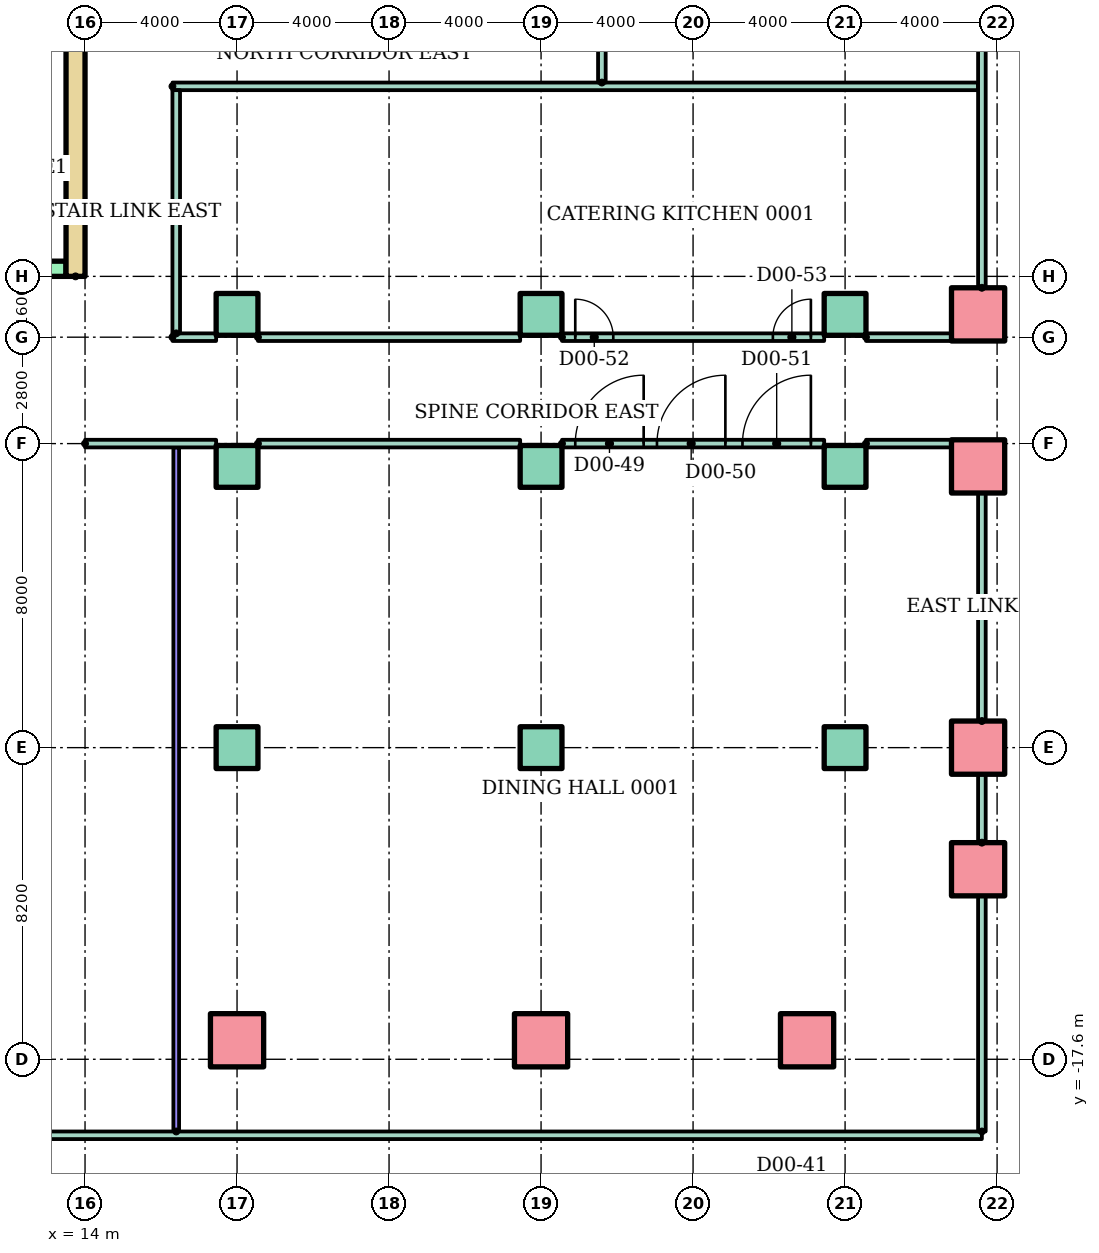
"""IFC4 building model, lengths in metres.
Left out: names, types, materials, properties, quantities, classifications, styles, units other than length and angle.
Written with IfcOpenShell. Run it as: python <this file> out.ifc"""

import sys

from ifc_helpers import new_model, si_unit, direction, frame, frame_2d, origin, origin_2d, place, context, subcontext, project, spatial, rectangle, hollow_rectangle, extrude, element, fill, save


model = new_model("IFC4")
c1 = context("Model", 3, precision=1e-05, world=origin(), true_north=direction((0.0, 1.0)))
c2 = subcontext(c1, "Body", "Model", "MODEL_VIEW")
j1 = project(units=[si_unit("LENGTHUNIT", "METRE"), si_unit("PLANEANGLEUNIT", "RADIAN")], contexts=[c1])
p1 = place(None, origin())
s1 = spatial("IfcSite", under=j1, at=p1, CompositionType="ELEMENT")
p2 = place(p1, origin())
s2 = spatial("IfcBuilding", under=s1, at=p2, CompositionType="ELEMENT")
p3 = place(p2, origin())
s3 = spatial("IfcBuildingStorey", under=s2, at=p3, CompositionType="ELEMENT", Elevation=0.0)
for number, where in (
    (1, (18.0, -17.1, 0.0)),
    (2, (26.0, -17.1, 0.0)),
    (3, (33.0, -17.1, 0.0)),
    (4, (37.5, -12.6, 0.0)),
):
    element("IfcColumn", number, at=place(p3, frame(where)), inside=s3, PredefinedType="COLUMN", context=c2, shape_type="SweptSolid", body=[
        extrude(hollow_rectangle(XDim=1.4, YDim=1.4, WallThickness=0.08, at=origin_2d()), origin(), (0.0, 0.0, 1.0), 6.0),
    ])
for number, where in (
    (5, (18.0, -9.4, 0.0)),
    (6, (26.0, -9.4, 0.0)),
    (7, (34.0, -9.4, 0.0)),
):
    element("IfcColumn", number, at=place(p3, frame(where)), inside=s3, PredefinedType="COLUMN", context=c2, shape_type="SweptSolid", body=[
        extrude(rectangle(XDim=1.1, YDim=1.1, at=origin_2d()), origin(), (0.0, 0.0, 1.0), 6.0),
    ])
p4 = place(p3, frame((37.5, -9.4, 0.0)))
e8 = element("IfcColumn", 8, at=p4, inside=s3, PredefinedType="COLUMN", context=c2, shape_type="SweptSolid", body=[
    extrude(hollow_rectangle(XDim=1.4, YDim=1.4, WallThickness=0.08, at=origin_2d()), origin(), (0.0, 0.0, 1.0), 6.0),
])
for number, where in (
    (9, (18.0, -2.0, 0.0)),
    (10, (26.0, -2.0, 0.0)),
    (11, (34.0, -2.0, 0.0)),
):
    element("IfcColumn", number, at=place(p3, frame(where)), inside=s3, PredefinedType="COLUMN", context=c2, shape_type="SweptSolid", body=[
        extrude(rectangle(XDim=1.1, YDim=1.1, at=origin_2d()), origin(), (0.0, 0.0, 1.0), 6.0),
    ])
p5 = place(p3, frame((37.5, -2.0, 0.0)))
e12 = element("IfcColumn", 12, at=p5, inside=s3, PredefinedType="COLUMN", context=c2, shape_type="SweptSolid", body=[
    extrude(hollow_rectangle(XDim=1.4, YDim=1.4, WallThickness=0.08, at=origin_2d()), origin(), (0.0, 0.0, 1.0), 6.0),
])
for number, where in (
    (13, (18.0, 2.0, 0.0)),
    (14, (26.0, 2.0, 0.0)),
    (15, (34.0, 2.0, 0.0)),
):
    element("IfcColumn", number, at=place(p3, frame(where)), inside=s3, PredefinedType="COLUMN", context=c2, shape_type="SweptSolid", body=[
        extrude(rectangle(XDim=1.1, YDim=1.1, at=origin_2d()), origin(), (0.0, 0.0, 1.0), 6.0),
    ])
p6 = place(p3, frame((37.5, 2.0, 0.0)))
e16 = element("IfcColumn", 16, at=p6, inside=s3, PredefinedType="COLUMN", context=c2, shape_type="SweptSolid", body=[
    extrude(hollow_rectangle(XDim=1.4, YDim=1.4, WallThickness=0.08, at=origin_2d()), origin(), (0.0, 0.0, 1.0), 6.0),
])
p7 = place(p3, frame((13.75, 3.0, 0.0), z_axis=(0.0, 0.0, 1.0), x_axis=(0.0, 1.0, 0.0)))
e17 = element("IfcWall", 17, at=p7, inside=s3, PredefinedType="SHEAR", context=c2, shape_type="SweptSolid", body=[
    extrude(rectangle(XDim=17.0, YDim=0.5, at=frame_2d((8.5, 0.0))), origin(), (0.0, 0.0, 1.0), 5.7),
])
p8 = place(p3, frame((-13.5, 3.2, 0.0)))
e18 = element("IfcWall", 18, at=p8, inside=s3, PredefinedType="SHEAR", context=c2, shape_type="SweptSolid", body=[
    extrude(rectangle(XDim=27.0, YDim=0.4, at=frame_2d((13.5, 0.0))), origin(), (0.0, 0.0, 1.0), 5.7),
])
p9 = place(p8, frame((0.772, 0.0, 0.0)))
e19 = element("IfcOpeningElement", 19, at=p9, cuts=e18, PredefinedType="OPENING", context=c2, shape_type="SweptSolid", body=[
    extrude(rectangle(XDim=1.1, YDim=2.1, at=frame_2d((0.55, 1.05))), frame((0.0, 0.21, 0.0), z_axis=(0.0, -1.0, 0.0), x_axis=(1.0, 0.0, 0.0)), (0.0, 0.0, 1.0), 0.42),
])
p10 = place(p8, frame((3.817, 0.0, 0.0)))
e20 = element("IfcOpeningElement", 20, at=p10, cuts=e18, PredefinedType="OPENING", context=c2, shape_type="SweptSolid", body=[
    extrude(rectangle(XDim=1.1, YDim=2.1, at=frame_2d((0.55, 1.05))), frame((0.0, 0.21, 0.0), z_axis=(0.0, -1.0, 0.0), x_axis=(1.0, 0.0, 0.0)), (0.0, 0.0, 1.0), 0.42),
])
p11 = place(p8, frame((6.861, 0.0, 0.0)))
e21 = element("IfcOpeningElement", 21, at=p11, cuts=e18, PredefinedType="OPENING", context=c2, shape_type="SweptSolid", body=[
    extrude(rectangle(XDim=1.1, YDim=2.1, at=frame_2d((0.55, 1.05))), frame((0.0, 0.21, 0.0), z_axis=(0.0, -1.0, 0.0), x_axis=(1.0, 0.0, 0.0)), (0.0, 0.0, 1.0), 0.42),
])
p12 = place(p8, frame((9.906, 0.0, 0.0)))
e22 = element("IfcOpeningElement", 22, at=p12, cuts=e18, PredefinedType="OPENING", context=c2, shape_type="SweptSolid", body=[
    extrude(rectangle(XDim=1.1, YDim=2.1, at=frame_2d((0.55, 1.05))), frame((0.0, 0.21, 0.0), z_axis=(0.0, -1.0, 0.0), x_axis=(1.0, 0.0, 0.0)), (0.0, 0.0, 1.0), 0.42),
])
p13 = place(p8, frame((15.994, 0.0, 0.0)))
e23 = element("IfcOpeningElement", 23, at=p13, cuts=e18, PredefinedType="OPENING", context=c2, shape_type="SweptSolid", body=[
    extrude(rectangle(XDim=1.1, YDim=2.1, at=frame_2d((0.55, 1.05))), frame((0.0, 0.21, 0.0), z_axis=(0.0, -1.0, 0.0), x_axis=(1.0, 0.0, 0.0)), (0.0, 0.0, 1.0), 0.42),
])
p14 = place(p8, frame((19.039, 0.0, 0.0)))
e24 = element("IfcOpeningElement", 24, at=p14, cuts=e18, PredefinedType="OPENING", context=c2, shape_type="SweptSolid", body=[
    extrude(rectangle(XDim=1.1, YDim=2.1, at=frame_2d((0.55, 1.05))), frame((0.0, 0.21, 0.0), z_axis=(0.0, -1.0, 0.0), x_axis=(1.0, 0.0, 0.0)), (0.0, 0.0, 1.0), 0.42),
])
p15 = place(p8, frame((12.6, 0.0, 0.0)))
e25 = element("IfcOpeningElement", 25, at=p15, cuts=e18, PredefinedType="OPENING", context=c2, shape_type="SweptSolid", body=[
    extrude(rectangle(XDim=1.8, YDim=2.1, at=frame_2d((0.9, 1.05))), frame((0.0, 0.21, 0.0), z_axis=(0.0, -1.0, 0.0), x_axis=(1.0, 0.0, 0.0)), (0.0, 0.0, 1.0), 0.42),
])
p16 = place(p3, frame((-37.6, -19.6, 0.0)))
e26 = element("IfcWall", 26, at=p16, inside=s3, PredefinedType="PARTITIONING", context=c2, shape_type="SweptSolid", body=[
    extrude(rectangle(XDim=75.2, YDim=0.2, at=frame_2d((37.6, 0.0))), origin(), (0.0, 0.0, 1.0), 5.7),
])
p17 = place(p16, frame((26.204, 0.0, 0.0)))
e27 = element("IfcOpeningElement", 27, at=p17, cuts=e26, PredefinedType="OPENING", context=c2, shape_type="SweptSolid", body=[
    extrude(rectangle(XDim=1.8, YDim=2.1, at=frame_2d((0.9, 1.05))), frame((0.0, 0.11, 0.0), z_axis=(0.0, -1.0, 0.0), x_axis=(1.0, 0.0, 0.0)), (0.0, 0.0, 1.0), 0.22),
])
p18 = place(p16, frame((36.7, 0.0, 0.0)))
e28 = element("IfcOpeningElement", 28, at=p18, cuts=e26, PredefinedType="OPENING", context=c2, shape_type="SweptSolid", body=[
    extrude(rectangle(XDim=1.8, YDim=2.1, at=frame_2d((0.9, 1.05))), frame((0.0, 0.11, 0.0), z_axis=(0.0, -1.0, 0.0), x_axis=(1.0, 0.0, 0.0)), (0.0, 0.0, 1.0), 0.22),
])
p19 = place(p16, frame((47.196, 0.0, 0.0)))
e29 = element("IfcOpeningElement", 29, at=p19, cuts=e26, PredefinedType="OPENING", context=c2, shape_type="SweptSolid", body=[
    extrude(rectangle(XDim=1.8, YDim=2.1, at=frame_2d((0.9, 1.05))), frame((0.0, 0.11, 0.0), z_axis=(0.0, -1.0, 0.0), x_axis=(1.0, 0.0, 0.0)), (0.0, 0.0, 1.0), 0.22),
])
p20 = place(p3, frame((14.0, -1.4, 0.0)))
e30 = element("IfcWall", 30, at=p20, inside=s3, PredefinedType="PARTITIONING", context=c2, shape_type="SweptSolid", body=[
    extrude(rectangle(XDim=3.45, YDim=0.2, at=frame_2d((1.725, 0.0))), origin(), (0.0, 0.0, 1.0), 5.7),
])
p21 = place(p3, frame((18.55, -1.4, 0.0)))
e31 = element("IfcWall", 31, at=p21, inside=s3, PredefinedType="PARTITIONING", context=c2, shape_type="SweptSolid", body=[
    extrude(rectangle(XDim=6.9, YDim=0.2, at=frame_2d((3.45, 0.0))), origin(), (0.0, 0.0, 1.0), 5.7),
])
p22 = place(p3, frame((26.55, -1.4, 0.0)))
e32 = element("IfcWall", 32, at=p22, inside=s3, PredefinedType="PARTITIONING", context=c2, shape_type="SweptSolid", body=[
    extrude(rectangle(XDim=6.9, YDim=0.2, at=frame_2d((3.45, 0.0))), origin(), (0.0, 0.0, 1.0), 5.7),
])
p23 = place(p22, frame((0.35, 0.0, 0.0)))
e33 = element("IfcOpeningElement", 33, at=p23, cuts=e32, PredefinedType="OPENING", context=c2, shape_type="SweptSolid", body=[
    extrude(rectangle(XDim=1.8, YDim=2.1, at=frame_2d((0.9, 1.05))), frame((0.0, 0.11, 0.0), z_axis=(0.0, -1.0, 0.0), x_axis=(1.0, 0.0, 0.0)), (0.0, 0.0, 1.0), 0.22),
])
p24 = place(p22, frame((2.5, 0.0, 0.0)))
e34 = element("IfcOpeningElement", 34, at=p24, cuts=e32, PredefinedType="OPENING", context=c2, shape_type="SweptSolid", body=[
    extrude(rectangle(XDim=1.8, YDim=2.1, at=frame_2d((0.9, 1.05))), frame((0.0, 0.11, 0.0), z_axis=(0.0, -1.0, 0.0), x_axis=(1.0, 0.0, 0.0)), (0.0, 0.0, 1.0), 0.22),
])
p25 = place(p22, frame((4.75, 0.0, 0.0)))
e35 = element("IfcOpeningElement", 35, at=p25, cuts=e32, PredefinedType="OPENING", context=c2, shape_type="SweptSolid", body=[
    extrude(rectangle(XDim=1.8, YDim=2.1, at=frame_2d((0.9, 1.05))), frame((0.0, 0.11, 0.0), z_axis=(0.0, -1.0, 0.0), x_axis=(1.0, 0.0, 0.0)), (0.0, 0.0, 1.0), 0.22),
])
p26 = place(p3, frame((34.55, -1.4, 0.0)))
e36 = element("IfcWall", 36, at=p26, inside=s3, PredefinedType="PARTITIONING", context=c2, shape_type="SweptSolid", body=[
    extrude(rectangle(XDim=2.25, YDim=0.2, at=frame_2d((1.125, 0.0))), origin(), (0.0, 0.0, 1.0), 5.7),
])
p27 = place(p3, frame((16.3, 1.4, 0.0)))
e37 = element("IfcWall", 37, at=p27, inside=s3, PredefinedType="PARTITIONING", context=c2, shape_type="SweptSolid", body=[
    extrude(rectangle(XDim=1.15, YDim=0.2, at=frame_2d((0.575, 0.0))), origin(), (0.0, 0.0, 1.0), 5.7),
])
p28 = place(p3, frame((18.55, 1.4, 0.0)))
e38 = element("IfcWall", 38, at=p28, inside=s3, PredefinedType="PARTITIONING", context=c2, shape_type="SweptSolid", body=[
    extrude(rectangle(XDim=6.9, YDim=0.2, at=frame_2d((3.45, 0.0))), origin(), (0.0, 0.0, 1.0), 5.7),
])
p29 = place(p3, frame((26.55, 1.4, 0.0)))
e39 = element("IfcWall", 39, at=p29, inside=s3, PredefinedType="PARTITIONING", context=c2, shape_type="SweptSolid", body=[
    extrude(rectangle(XDim=6.9, YDim=0.2, at=frame_2d((3.45, 0.0))), origin(), (0.0, 0.0, 1.0), 5.7),
])
p30 = place(p29, frame((0.35, 0.0, 0.0)))
e40 = element("IfcOpeningElement", 40, at=p30, cuts=e39, PredefinedType="OPENING", context=c2, shape_type="SweptSolid", body=[
    extrude(rectangle(XDim=1.0, YDim=2.1, at=frame_2d((0.5, 1.05))), frame((0.0, 0.11, 0.0), z_axis=(0.0, -1.0, 0.0), x_axis=(1.0, 0.0, 0.0)), (0.0, 0.0, 1.0), 0.22),
])
p31 = place(p29, frame((5.55, 0.0, 0.0)))
e41 = element("IfcOpeningElement", 41, at=p31, cuts=e39, PredefinedType="OPENING", context=c2, shape_type="SweptSolid", body=[
    extrude(rectangle(XDim=1.0, YDim=2.1, at=frame_2d((0.5, 1.05))), frame((0.0, 0.11, 0.0), z_axis=(0.0, -1.0, 0.0), x_axis=(1.0, 0.0, 0.0)), (0.0, 0.0, 1.0), 0.22),
])
p32 = place(p3, frame((34.55, 1.4, 0.0)))
e42 = element("IfcWall", 42, at=p32, inside=s3, PredefinedType="PARTITIONING", context=c2, shape_type="SweptSolid", body=[
    extrude(rectangle(XDim=2.25, YDim=0.2, at=frame_2d((1.125, 0.0))), origin(), (0.0, 0.0, 1.0), 5.7),
])
p33 = place(p3, frame((16.3, 8.0, 0.0)))
e43 = element("IfcWall", 43, at=p33, inside=s3, PredefinedType="PARTITIONING", context=c2, shape_type="SweptSolid", body=[
    extrude(rectangle(XDim=21.2, YDim=0.2, at=frame_2d((10.6, 0.0))), origin(), (0.0, 0.0, 1.0), 5.7),
])
p34 = place(p3, frame((16.4, 1.5, 0.0), z_axis=(0.0, 0.0, 1.0), x_axis=(0.0, 1.0, 0.0)))
e44 = element("IfcWall", 44, at=p34, inside=s3, PredefinedType="PARTITIONING", context=c2, shape_type="SweptSolid", body=[
    extrude(rectangle(XDim=6.4, YDim=0.2, at=frame_2d((3.2, 0.0))), origin(), (0.0, 0.0, 1.0), 5.7),
])
p35 = place(p3, frame((16.4, -19.5, 0.0), z_axis=(0.0, 0.0, 1.0), x_axis=(0.0, 1.0, 0.0)))
e45 = element("IfcWall", 45, at=p35, inside=s3, PredefinedType="PARTITIONING", context=c2, shape_type="SweptSolid", body=[
    extrude(rectangle(XDim=18.0, YDim=0.15, at=frame_2d((9.0, 0.0))), origin(), (0.0, 0.0, 1.0), 5.7),
])
p36 = place(p3, frame((27.6, 8.1, 0.0), z_axis=(0.0, 0.0, 1.0), x_axis=(0.0, 1.0, 0.0)))
e46 = element("IfcWall", 46, at=p36, inside=s3, PredefinedType="PARTITIONING", context=c2, shape_type="SweptSolid", body=[
    extrude(rectangle(XDim=11.5, YDim=0.2, at=frame_2d((5.75, 0.0))), origin(), (0.0, 0.0, 1.0), 5.7),
])
p37 = place(p36, frame((0.9, 0.0, 0.0)))
e47 = element("IfcOpeningElement", 47, at=p37, cuts=e46, PredefinedType="OPENING", context=c2, shape_type="SweptSolid", body=[
    extrude(rectangle(XDim=1.0, YDim=2.1, at=frame_2d((0.5, 1.05))), frame((0.0, 0.11, 0.0), z_axis=(0.0, -1.0, 0.0), x_axis=(1.0, 0.0, 0.0)), (0.0, 0.0, 1.0), 0.22),
])
p38 = place(p3, frame((37.6, -19.5, 0.0), z_axis=(0.0, 0.0, 1.0), x_axis=(0.0, 1.0, 0.0)))
e48 = element("IfcWall", 48, at=p38, inside=s3, PredefinedType="PARTITIONING", context=c2, shape_type="SweptSolid", body=[
    extrude(rectangle(XDim=6.2, YDim=0.2, at=frame_2d((3.1, 0.0))), origin(), (0.0, 0.0, 1.0), 5.7),
])
p39 = place(p3, frame((37.6, -11.9, 0.0), z_axis=(0.0, 0.0, 1.0), x_axis=(0.0, 1.0, 0.0)))
e49 = element("IfcWall", 49, at=p39, inside=s3, PredefinedType="PARTITIONING", context=c2, shape_type="SweptSolid", body=[
    extrude(rectangle(XDim=1.8, YDim=0.2, at=frame_2d((0.9, 0.0))), origin(), (0.0, 0.0, 1.0), 5.7),
])
p40 = place(p3, frame((37.6, -8.7, 0.0), z_axis=(0.0, 0.0, 1.0), x_axis=(0.0, 1.0, 0.0)))
e50 = element("IfcWall", 50, at=p40, inside=s3, PredefinedType="PARTITIONING", context=c2, shape_type="SweptSolid", body=[
    extrude(rectangle(XDim=6.0, YDim=0.2, at=frame_2d((3.0, 0.0))), origin(), (0.0, 0.0, 1.0), 5.7),
])
p41 = place(p3, frame((37.6, 2.7, 0.0), z_axis=(0.0, 0.0, 1.0), x_axis=(0.0, 1.0, 0.0)))
e51 = element("IfcWall", 51, at=p41, inside=s3, PredefinedType="PARTITIONING", context=c2, shape_type="SweptSolid", body=[
    extrude(rectangle(XDim=7.6, YDim=0.2, at=frame_2d((3.8, 0.0))), origin(), (0.0, 0.0, 1.0), 5.7),
])
p42 = place(p41, frame((6.25, 0.0, 0.0)))
e52 = element("IfcOpeningElement", 52, at=p42, cuts=e51, PredefinedType="OPENING", context=c2, shape_type="SweptSolid", body=[
    extrude(rectangle(XDim=1.0, YDim=2.1, at=frame_2d((0.5, 1.05))), frame((0.0, 0.11, 0.0), z_axis=(0.0, -1.0, 0.0), x_axis=(1.0, 0.0, 0.0)), (0.0, 0.0, 1.0), 0.22),
])
p43 = place(p23, origin())
e53 = element("IfcDoor", 53, at=p43, inside=s3, OperationType="DOUBLE_DOOR_SINGLE_SWING", PredefinedType="DOOR", context=c2, shape_type="SweptSolid", body=[
    extrude(rectangle(XDim=1.8, YDim=2.1, at=frame_2d((0.9, 1.05))), frame((0.0, 0.025, 0.0), z_axis=(0.0, -1.0, 0.0), x_axis=(1.0, 0.0, 0.0)), (0.0, 0.0, 1.0), 0.05),
])
fill(e33, e53)
p44 = place(p24, origin())
e54 = element("IfcDoor", 54, at=p44, inside=s3, OperationType="DOUBLE_DOOR_SINGLE_SWING", PredefinedType="DOOR", context=c2, shape_type="SweptSolid", body=[
    extrude(rectangle(XDim=1.8, YDim=2.1, at=frame_2d((0.9, 1.05))), frame((0.0, 0.025, 0.0), z_axis=(0.0, -1.0, 0.0), x_axis=(1.0, 0.0, 0.0)), (0.0, 0.0, 1.0), 0.05),
])
fill(e34, e54)
p45 = place(p25, origin())
e55 = element("IfcDoor", 55, at=p45, inside=s3, OperationType="DOUBLE_DOOR_SINGLE_SWING", PredefinedType="DOOR", context=c2, shape_type="SweptSolid", body=[
    extrude(rectangle(XDim=1.8, YDim=2.1, at=frame_2d((0.9, 1.05))), frame((0.0, 0.025, 0.0), z_axis=(0.0, -1.0, 0.0), x_axis=(1.0, 0.0, 0.0)), (0.0, 0.0, 1.0), 0.05),
])
fill(e35, e55)
p46 = place(p30, origin())
e56 = element("IfcDoor", 56, at=p46, inside=s3, OperationType="SINGLE_SWING_LEFT", PredefinedType="DOOR", context=c2, shape_type="SweptSolid", body=[
    extrude(rectangle(XDim=1.0, YDim=2.1, at=frame_2d((0.5, 1.05))), frame((0.0, 0.025, 0.0), z_axis=(0.0, -1.0, 0.0), x_axis=(1.0, 0.0, 0.0)), (0.0, 0.0, 1.0), 0.05),
])
fill(e40, e56)
p47 = place(p31, origin())
e57 = element("IfcDoor", 57, at=p47, inside=s3, OperationType="SINGLE_SWING_RIGHT", PredefinedType="DOOR", context=c2, shape_type="SweptSolid", body=[
    extrude(rectangle(XDim=1.0, YDim=2.1, at=frame_2d((0.5, 1.05))), frame((0.0, 0.025, 0.0), z_axis=(0.0, -1.0, 0.0), x_axis=(1.0, 0.0, 0.0)), (0.0, 0.0, 1.0), 0.05),
])
fill(e41, e57)
save(model, sys.argv[1])
